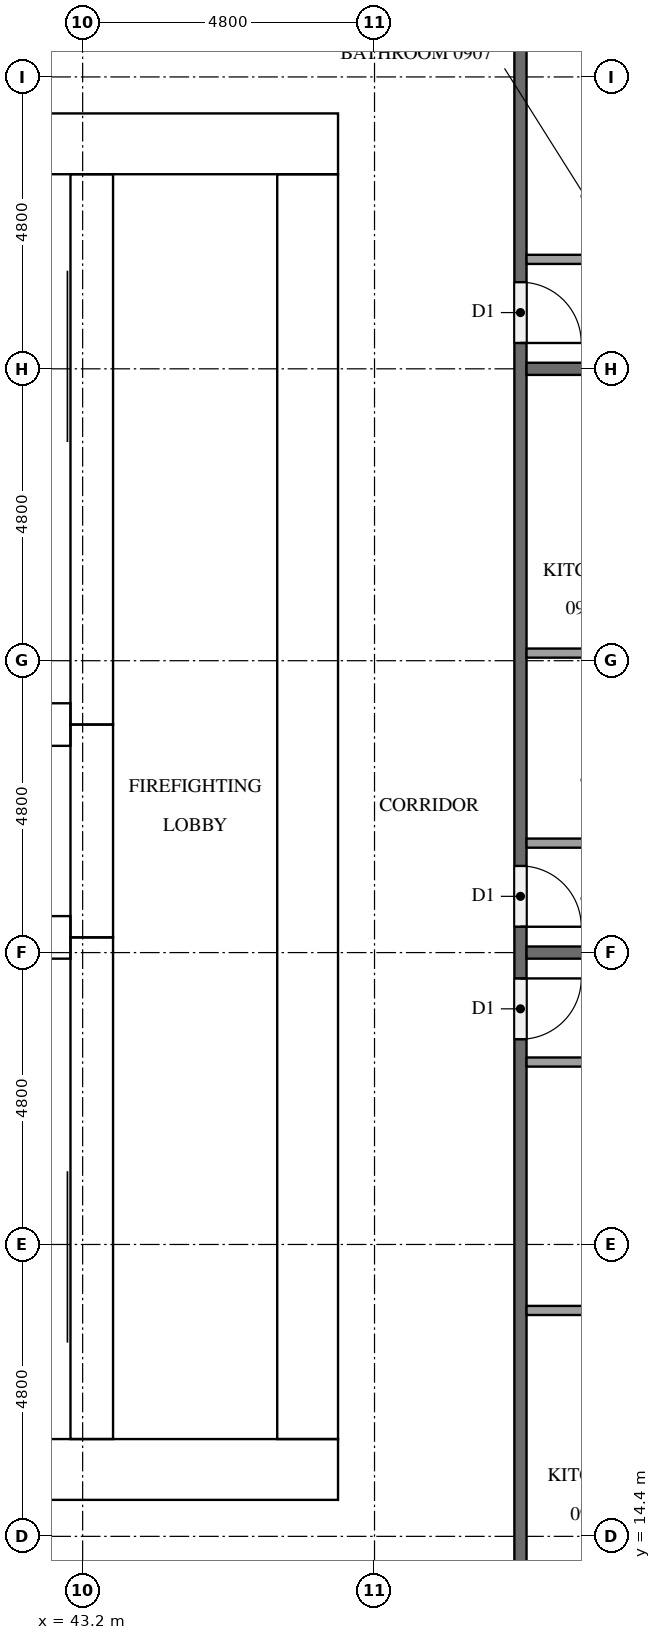
"""IFC4 building model, lengths in metres.
Left out: names, types, materials, properties, quantities, classifications, styles, units other than length and angle.
Written with IfcOpenShell. Run it as: python <this file> out.ifc"""

import sys

from ifc_helpers import new_model, si_unit, direction, frame, frame_2d, origin, place, context, subcontext, project, spatial, rectangle, extrude, element, fill, save


model = new_model("IFC4")
c1 = context("Model", 3, precision=1e-05, world=origin(), true_north=direction((0.0, 1.0)))
c2 = subcontext(c1, "Body", "Model", "MODEL_VIEW")
j1 = project(units=[si_unit("LENGTHUNIT", "METRE"), si_unit("PLANEANGLEUNIT", "RADIAN")], contexts=[c1])
p1 = place(None, origin())
s1 = spatial("IfcSite", under=j1, at=p1, CompositionType="ELEMENT")
p2 = place(p1, origin())
s2 = spatial("IfcBuilding", under=s1, at=p2, CompositionType="ELEMENT")
p3 = place(p2, frame((0.0, 0.0, 39.9)))
s3 = spatial("IfcBuildingStorey", under=s2, at=p3, CompositionType="ELEMENT", Elevation=39.9)
p4 = place(p3, frame((15.0, 15.5, 0.0), z_axis=(0.0, 0.0, 1.0), x_axis=(1.0, 0.0, 0.0)))
e1 = element("IfcWall", 1, at=p4, inside=s3, PredefinedType="SHEAR", context=c2, shape_type="SweptSolid", body=[
    extrude(rectangle(XDim=32.4, YDim=1.0, at=frame_2d((16.2, 0.0))), origin(), (0.0, 0.0, 1.0), 3.2),
])
p5 = place(p4, frame((15.3, 0.0, 0.0)))
e2 = element("IfcOpeningElement", 2, at=p5, cuts=e1, PredefinedType="OPENING", context=c2, shape_type="SweptSolid", body=[
    extrude(rectangle(XDim=1.8, YDim=2.1, at=frame_2d((0.9, 1.05))), frame((0.0, 0.51, 0.0), z_axis=(0.0, -1.0, 0.0), x_axis=(1.0, 0.0, 0.0)), (0.0, 0.0, 1.0), 1.02),
])
p6 = place(p3, frame((15.0, 37.3, 0.0), z_axis=(0.0, 0.0, 1.0), x_axis=(1.0, 0.0, 0.0)))
e3 = element("IfcWall", 3, at=p6, inside=s3, PredefinedType="SHEAR", context=c2, shape_type="SweptSolid", body=[
    extrude(rectangle(XDim=32.4, YDim=1.0, at=frame_2d((16.2, 0.0))), origin(), (0.0, 0.0, 1.0), 3.2),
])
p7 = place(p6, frame((15.3, 0.0, 0.0)))
e4 = element("IfcOpeningElement", 4, at=p7, cuts=e3, PredefinedType="OPENING", context=c2, shape_type="SweptSolid", body=[
    extrude(rectangle(XDim=1.8, YDim=2.1, at=frame_2d((0.9, 1.05))), frame((0.0, 0.51, 0.0), z_axis=(0.0, -1.0, 0.0), x_axis=(1.0, 0.0, 0.0)), (0.0, 0.0, 1.0), 1.02),
])
p8 = place(p6, frame((1.766, 0.0, 0.0)))
e5 = element("IfcOpeningElement", 5, at=p8, cuts=e3, PredefinedType="OPENING", context=c2, shape_type="SweptSolid", body=[
    extrude(rectangle(XDim=1.0, YDim=2.1, at=frame_2d((0.5, 1.05))), frame((0.0, 0.51, 0.0), z_axis=(0.0, -1.0, 0.0), x_axis=(1.0, 0.0, 0.0)), (0.0, 0.0, 1.0), 1.02),
])
p9 = place(p6, frame((5.241, 0.0, 0.0)))
e6 = element("IfcOpeningElement", 6, at=p9, cuts=e3, PredefinedType="OPENING", context=c2, shape_type="SweptSolid", body=[
    extrude(rectangle(XDim=1.0, YDim=2.1, at=frame_2d((0.5, 1.05))), frame((0.0, 0.51, 0.0), z_axis=(0.0, -1.0, 0.0), x_axis=(1.0, 0.0, 0.0)), (0.0, 0.0, 1.0), 1.02),
])
p10 = place(p3, frame((46.9, 16.0, 0.0), z_axis=(0.0, 0.0, 1.0), x_axis=(0.0, 1.0, 0.0)))
e7 = element("IfcWall", 7, at=p10, inside=s3, PredefinedType="SHEAR", context=c2, shape_type="SweptSolid", body=[
    extrude(rectangle(XDim=20.8, YDim=1.0, at=frame_2d((10.4, 0.0))), origin(), (0.0, 0.0, 1.0), 3.2),
])
p11 = place(p10, frame((10.1, 0.0, 0.0)))
e8 = element("IfcOpeningElement", 8, at=p11, cuts=e7, PredefinedType="OPENING", context=c2, shape_type="SweptSolid", body=[
    extrude(rectangle(XDim=1.2, YDim=2.1, at=frame_2d((0.6, 1.05))), frame((0.0, 0.51, 0.0), z_axis=(0.0, -1.0, 0.0), x_axis=(1.0, 0.0, 0.0)), (0.0, 0.0, 1.0), 1.02),
])
p12 = place(p3, frame((43.35, 16.0, 0.0), z_axis=(0.0, 0.0, 1.0), x_axis=(0.0, 1.0, 0.0)))
e9 = element("IfcWall", 9, at=p12, inside=s3, PredefinedType="SHEAR", context=c2, shape_type="SweptSolid", body=[
    extrude(rectangle(XDim=8.25, YDim=0.7, at=frame_2d((4.125, 0.0))), origin(), (0.0, 0.0, 1.0), 3.2),
])
p13 = place(p12, frame((0.2, 0.0, 0.0)))
e10 = element("IfcOpeningElement", 10, at=p13, cuts=e9, PredefinedType="OPENING", context=c2, shape_type="SweptSolid", body=[
    extrude(rectangle(XDim=1.2, YDim=2.1, at=frame_2d((0.6, 1.05))), frame((0.0, 0.36, 0.0), z_axis=(0.0, -1.0, 0.0), x_axis=(1.0, 0.0, 0.0)), (0.0, 0.0, 1.0), 0.72),
])
p14 = place(p3, frame((43.35, 24.25, 0.0), z_axis=(0.0, 0.0, 1.0), x_axis=(0.0, 1.0, 0.0)))
e11 = element("IfcWall", 11, at=p14, inside=s3, PredefinedType="SHEAR", context=c2, shape_type="SweptSolid", body=[
    extrude(rectangle(XDim=3.5, YDim=0.7, at=frame_2d((1.75, 0.0))), origin(), (0.0, 0.0, 1.0), 3.2),
])
p15 = place(p14, frame((1.2, 0.0, 0.0)))
e12 = element("IfcOpeningElement", 12, at=p15, cuts=e11, PredefinedType="OPENING", context=c2, shape_type="SweptSolid", body=[
    extrude(rectangle(XDim=1.1, YDim=2.1, at=frame_2d((0.55, 1.05))), frame((0.0, 0.36, 0.0), z_axis=(0.0, -1.0, 0.0), x_axis=(1.0, 0.0, 0.0)), (0.0, 0.0, 1.0), 0.72),
])
p16 = place(p3, frame((43.35, 27.75, 0.0), z_axis=(0.0, 0.0, 1.0), x_axis=(0.0, 1.0, 0.0)))
e13 = element("IfcWall", 13, at=p16, inside=s3, PredefinedType="SHEAR", context=c2, shape_type="SweptSolid", body=[
    extrude(rectangle(XDim=9.05, YDim=0.7, at=frame_2d((4.525, 0.0))), origin(), (0.0, 0.0, 1.0), 3.2),
])
p17 = place(p16, frame((7.65, 0.0, 0.0)))
e14 = element("IfcOpeningElement", 14, at=p17, cuts=e13, PredefinedType="OPENING", context=c2, shape_type="SweptSolid", body=[
    extrude(rectangle(XDim=1.2, YDim=2.1, at=frame_2d((0.6, 1.05))), frame((0.0, 0.36, 0.0), z_axis=(0.0, -1.0, 0.0), x_axis=(1.0, 0.0, 0.0)), (0.0, 0.0, 1.0), 0.72),
])
for number, where, z_axis, x_axis in (
    (15, (39.65, 24.25, 0.0), (0.0, 0.0, 1.0), (1.0, 0.0, 0.0)),
    (16, (39.65, 27.75, 0.0), (0.0, 0.0, 1.0), (1.0, 0.0, 0.0)),
):
    element("IfcWall", number, at=place(p3, frame(where, z_axis=z_axis, x_axis=x_axis)), inside=s3, PredefinedType="SHEAR", context=c2, shape_type="SweptSolid", body=[
        extrude(rectangle(XDim=3.35, YDim=0.7, at=frame_2d((1.675, 0.0))), origin(), (0.0, 0.0, 1.0), 3.2),
    ])
p18 = place(p3, frame((50.4, 40.7, 0.0), z_axis=(0.0, 0.0, 1.0), x_axis=(0.0, -1.0, 0.0)))
e17 = element("IfcWall", 17, at=p18, inside=s3, PredefinedType="PARTITIONING", context=c2, shape_type="SweptSolid", body=[
    extrude(rectangle(XDim=28.6, YDim=0.2, at=frame_2d((14.3, 0.0))), origin(), (0.0, 0.0, 1.0), 3.2),
])
p19 = place(p18, frame((17.125, 0.0, 0.0)))
e18 = element("IfcOpeningElement", 18, at=p19, cuts=e17, PredefinedType="OPENING", context=c2, shape_type="SweptSolid", body=[
    extrude(rectangle(XDim=1.0, YDim=2.1, at=frame_2d((0.5, 1.05))), frame((0.0, 0.11, 0.0), z_axis=(0.0, -1.0, 0.0), x_axis=(1.0, 0.0, 0.0)), (0.0, 0.0, 1.0), 0.22),
])
p20 = place(p18, frame((15.275, 0.0, 0.0)))
e19 = element("IfcOpeningElement", 19, at=p20, cuts=e17, PredefinedType="OPENING", context=c2, shape_type="SweptSolid", body=[
    extrude(rectangle(XDim=1.0, YDim=2.1, at=frame_2d((0.5, 1.05))), frame((0.0, 0.11, 0.0), z_axis=(0.0, -1.0, 0.0), x_axis=(1.0, 0.0, 0.0)), (0.0, 0.0, 1.0), 0.22),
])
p21 = place(p18, frame((5.675, 0.0, 0.0)))
e20 = element("IfcOpeningElement", 20, at=p21, cuts=e17, PredefinedType="OPENING", context=c2, shape_type="SweptSolid", body=[
    extrude(rectangle(XDim=1.0, YDim=2.1, at=frame_2d((0.5, 1.05))), frame((0.0, 0.11, 0.0), z_axis=(0.0, -1.0, 0.0), x_axis=(1.0, 0.0, 0.0)), (0.0, 0.0, 1.0), 0.22),
])
for number, where, z_axis, x_axis in (
    (21, (50.5, 24.0, 0.0), (0.0, 0.0, 1.0), (1.0, 0.0, 0.0)),
    (22, (50.5, 33.6, 0.0), (0.0, 0.0, 1.0), (1.0, 0.0, 0.0)),
):
    element("IfcWall", number, at=place(p3, frame(where, z_axis=z_axis, x_axis=x_axis)), inside=s3, PredefinedType="PARTITIONING", context=c2, shape_type="SweptSolid", body=[
        extrude(rectangle(XDim=6.65, YDim=0.2, at=frame_2d((3.325, 0.0))), origin(), (0.0, 0.0, 1.0), 3.2),
    ])
p22 = place(p3, frame((50.5, 18.115, 0.0), z_axis=(0.0, 0.0, 1.0), x_axis=(1.0, 0.0, 0.0)))
e23 = element("IfcWall", 23, at=p22, inside=s3, PredefinedType="PARTITIONING", context=c2, shape_type="SweptSolid", body=[
    extrude(rectangle(XDim=2.075, YDim=0.15, at=frame_2d((1.038, 0.0))), origin(), (0.0, 0.0, 1.0), 3.2),
])
p23 = place(p3, frame((50.5, 22.2, 0.0), z_axis=(0.0, 0.0, 1.0), x_axis=(1.0, 0.0, 0.0)))
e24 = element("IfcWall", 24, at=p23, inside=s3, PredefinedType="PARTITIONING", context=c2, shape_type="SweptSolid", body=[
    extrude(rectangle(XDim=2.225, YDim=0.15, at=frame_2d((1.113, 0.0))), origin(), (0.0, 0.0, 1.0), 3.2),
])
p24 = place(p3, frame((50.5, 28.925, 0.0), z_axis=(0.0, 0.0, 1.0), x_axis=(1.0, 0.0, 0.0)))
e25 = element("IfcWall", 25, at=p24, inside=s3, PredefinedType="PARTITIONING", context=c2, shape_type="SweptSolid", body=[
    extrude(rectangle(XDim=1.925, YDim=0.15, at=frame_2d((0.962, 0.0))), origin(), (0.0, 0.0, 1.0), 3.2),
])
for number, where, z_axis, x_axis in (
    (26, (50.5, 25.8, 0.0), (0.0, 0.0, 1.0), (1.0, 0.0, 0.0)),
    (27, (50.5, 35.4, 0.0), (0.0, 0.0, 1.0), (1.0, 0.0, 0.0)),
):
    element("IfcWall", number, at=place(p3, frame(where, z_axis=z_axis, x_axis=x_axis)), inside=s3, PredefinedType="PARTITIONING", context=c2, shape_type="SweptSolid", body=[
        extrude(rectangle(XDim=2.075, YDim=0.15, at=frame_2d((1.038, 0.0))), origin(), (0.0, 0.0, 1.0), 3.2),
    ])
p25 = place(p15, origin())
e28 = element("IfcDoor", 28, at=p25, inside=s3, OperationType="DOUBLE_DOOR_SLIDING", PredefinedType="DOOR", context=c2, shape_type="SweptSolid", body=[
    extrude(rectangle(XDim=1.1, YDim=2.1, at=frame_2d((0.55, 1.05))), frame((0.0, 0.025, 0.0), z_axis=(0.0, -1.0, 0.0), x_axis=(1.0, 0.0, 0.0)), (0.0, 0.0, 1.0), 0.05),
])
fill(e12, e28)
p26 = place(p13, origin())
e29 = element("IfcDoor", 29, at=p26, inside=s3, OperationType="SINGLE_SWING_RIGHT", PredefinedType="DOOR", context=c2, shape_type="SweptSolid", body=[
    extrude(rectangle(XDim=1.2, YDim=2.1, at=frame_2d((0.6, 1.05))), frame((0.0, 0.025, 0.0), z_axis=(0.0, -1.0, 0.0), x_axis=(1.0, 0.0, 0.0)), (0.0, 0.0, 1.0), 0.05),
])
fill(e10, e29)
p27 = place(p17, origin())
e30 = element("IfcDoor", 30, at=p27, inside=s3, OperationType="SINGLE_SWING_LEFT", PredefinedType="DOOR", context=c2, shape_type="SweptSolid", body=[
    extrude(rectangle(XDim=1.2, YDim=2.1, at=frame_2d((0.6, 1.05))), frame((0.0, 0.025, 0.0), z_axis=(0.0, -1.0, 0.0), x_axis=(1.0, 0.0, 0.0)), (0.0, 0.0, 1.0), 0.05),
])
fill(e14, e30)
p28 = place(p11, origin())
e31 = element("IfcDoor", 31, at=p28, inside=s3, OperationType="SINGLE_SWING_LEFT", PredefinedType="DOOR", context=c2, shape_type="SweptSolid", body=[
    extrude(rectangle(XDim=1.2, YDim=2.1, at=frame_2d((0.6, 1.05))), frame((0.0, 0.025, 0.0), z_axis=(0.0, -1.0, 0.0), x_axis=(1.0, 0.0, 0.0)), (0.0, 0.0, 1.0), 0.05),
])
fill(e8, e31)
p29 = place(p19, origin())
e32 = element("IfcDoor", 32, at=p29, inside=s3, OperationType="SINGLE_SWING_LEFT", PredefinedType="DOOR", context=c2, shape_type="SweptSolid", body=[
    extrude(rectangle(XDim=1.0, YDim=2.1, at=frame_2d((0.5, 1.05))), frame((0.0, 0.025, 0.0), z_axis=(0.0, -1.0, 0.0), x_axis=(1.0, 0.0, 0.0)), (0.0, 0.0, 1.0), 0.05),
])
fill(e18, e32)
p30 = place(p20, origin())
e33 = element("IfcDoor", 33, at=p30, inside=s3, OperationType="SINGLE_SWING_RIGHT", PredefinedType="DOOR", context=c2, shape_type="SweptSolid", body=[
    extrude(rectangle(XDim=1.0, YDim=2.1, at=frame_2d((0.5, 1.05))), frame((0.0, 0.025, 0.0), z_axis=(0.0, -1.0, 0.0), x_axis=(1.0, 0.0, 0.0)), (0.0, 0.0, 1.0), 0.05),
])
fill(e19, e33)
p31 = place(p21, origin())
e34 = element("IfcDoor", 34, at=p31, inside=s3, OperationType="SINGLE_SWING_RIGHT", PredefinedType="DOOR", context=c2, shape_type="SweptSolid", body=[
    extrude(rectangle(XDim=1.0, YDim=2.1, at=frame_2d((0.5, 1.05))), frame((0.0, 0.025, 0.0), z_axis=(0.0, -1.0, 0.0), x_axis=(1.0, 0.0, 0.0)), (0.0, 0.0, 1.0), 0.05),
])
fill(e20, e34)
save(model, sys.argv[1])
